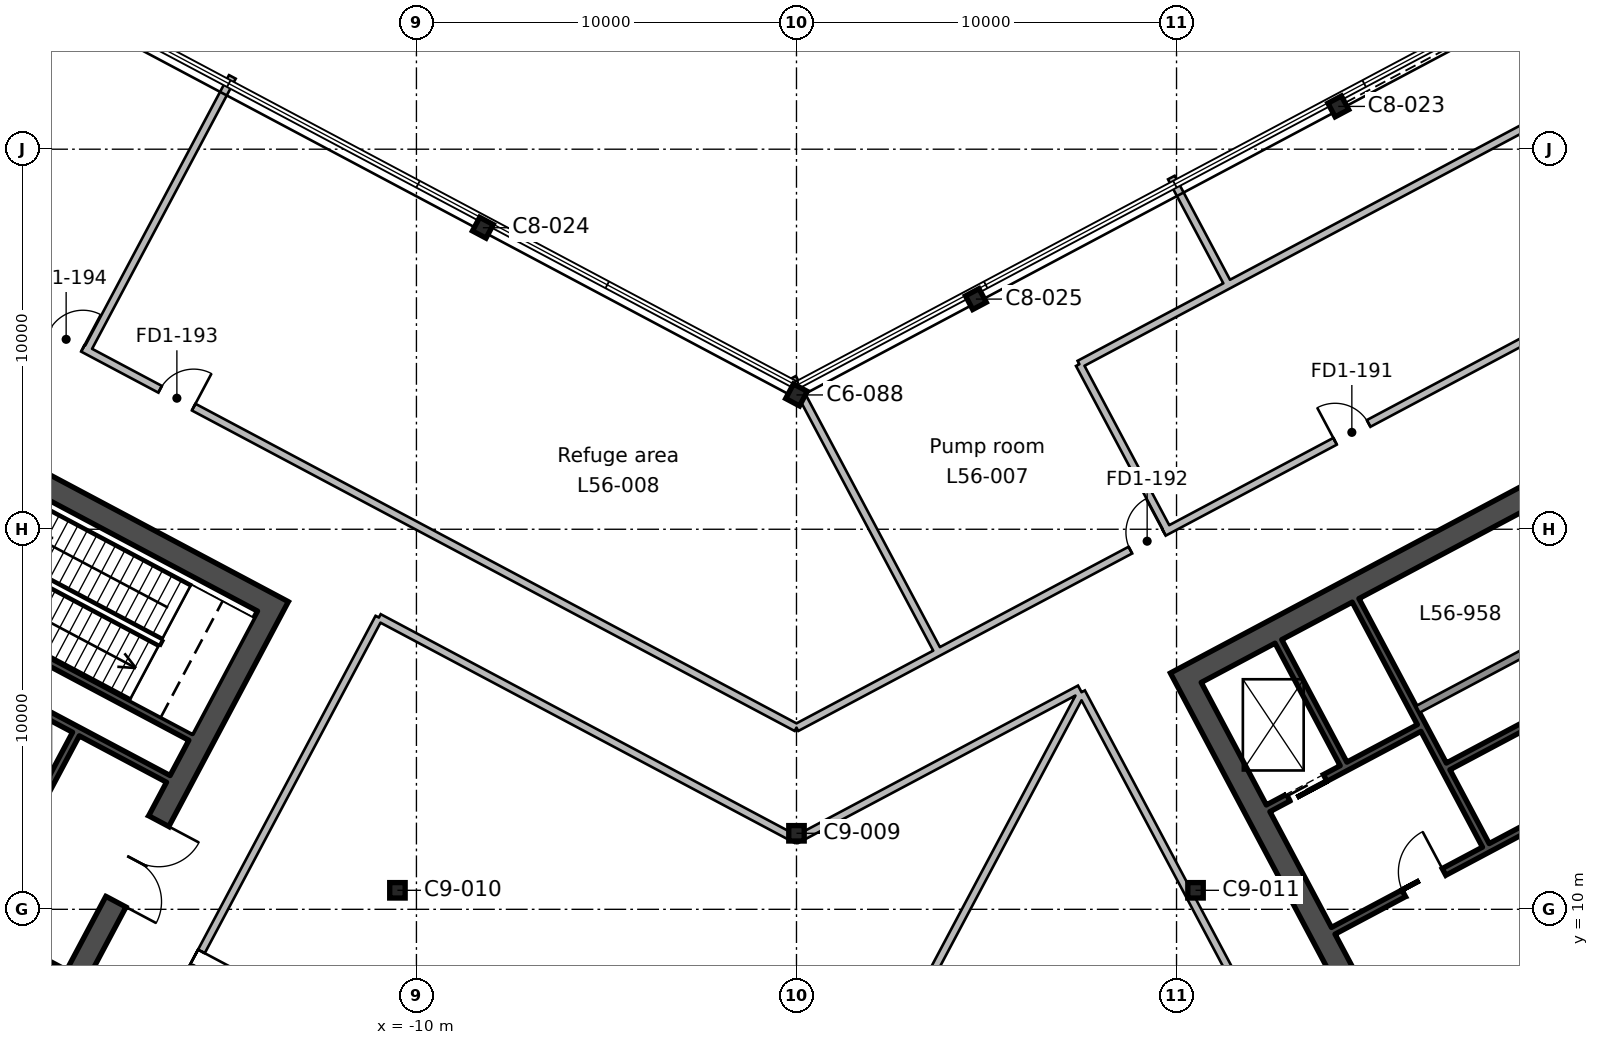
"""IFC4 building model, lengths in metres.
Left out: names, types, materials, properties, quantities, classifications, styles, units other than length and angle.
Written with IfcOpenShell. Run it as: python <this file> out.ifc"""

import sys

from ifc_helpers import new_model, si_unit, direction, frame, frame_2d, origin, origin_2d, place, context, subcontext, project, spatial, rectangle, hollow_rectangle, i_section, extrude, element, fill, save


model = new_model("IFC4")
c1 = context("Model", 3, precision=1e-05, world=origin(), true_north=direction((0.0, 1.0)))
c2 = subcontext(c1, "Body", "Model", "MODEL_VIEW")
j1 = project(units=[si_unit("LENGTHUNIT", "METRE"), si_unit("PLANEANGLEUNIT", "RADIAN")], contexts=[c1])
p1 = place(None, origin())
s1 = spatial("IfcSite", under=j1, at=p1, CompositionType="ELEMENT")
p2 = place(p1, origin())
s2 = spatial("IfcBuilding", under=s1, at=p2, CompositionType="ELEMENT")
p3 = place(p2, frame((0.0, 0.0, 252.0)))
s3 = spatial("IfcBuildingStorey", under=s2, at=p3, CompositionType="ELEMENT", Elevation=252.0)
for number, where, z_axis, x_axis in (
    (1, (-10.5, 10.5, 0.0), (0.0, 0.0, 1.0), (1.0, 0.0, 0.0)),
    (2, (10.5, 10.5, 0.0), (0.0, 0.0, 1.0), (1.0, 0.0, 0.0)),
    (3, (0.0, 12.0, 0.0), (0.0, 0.0, 1.0), (1.0, 0.0, 0.0)),
):
    element("IfcColumn", number, at=place(p3, frame(where, z_axis=z_axis, x_axis=x_axis)), inside=s3, PredefinedType="COLUMN", context=c2, shape_type="SweptSolid", body=[
        extrude(hollow_rectangle(XDim=0.406, YDim=0.406, WallThickness=0.015, InnerFilletRadius=0.007, OuterFilletRadius=0.022, at=origin_2d()), origin(), (0.0, 0.0, 1.0), 6.0),
    ])
p4 = place(p3, frame((0.0, 23.534, 0.0), z_axis=(0.0, 0.0, 1.0), x_axis=(-0.882947592859, 0.469471562786, 0.0)))
e4 = element("IfcColumn", 4, at=p4, inside=s3, PredefinedType="COLUMN", context=c2, shape_type="SweptSolid", body=[
    extrude(i_section(OverallWidth=0.412, OverallDepth=0.434, WebThickness=0.036, FlangeThickness=0.057, FilletRadius=0.015, at=origin_2d()), origin(), (0.0, 0.0, 1.0), 6.0),
])
for number, where, z_axis, x_axis in (
    (5, (4.72, 26.056, 0.0), (0.0, 0.0, 1.0), (-0.883, -0.469, 0.0)),
    (6, (-8.252, 27.934, 0.0), (0.0, 0.0, 1.0), (-0.883, 0.469, 0.0)),
    (7, (14.256, 31.126, 0.0), (0.0, 0.0, 1.0), (-0.883, -0.469, 0.0)),
):
    element("IfcColumn", number, at=place(p3, frame(where, z_axis=z_axis, x_axis=x_axis)), inside=s3, PredefinedType="COLUMN", context=c2, shape_type="SweptSolid", body=[
        extrude(i_section(OverallWidth=0.404, OverallDepth=0.406, WebThickness=0.027, FlangeThickness=0.044, FilletRadius=0.015, at=origin_2d()), origin(), (0.0, 0.0, 1.0), 6.0),
    ])
p5 = place(p3, frame((-13.635, 18.236, 0.0), z_axis=(0.0, 0.0, 1.0), x_axis=(-0.469478769487, -0.88294376095, 0.0)))
e8 = element("IfcWall", 8, at=p5, inside=s3, PredefinedType="SHEAR", context=c2, shape_type="SweptSolid", body=[
    extrude(rectangle(XDim=19.4, YDim=0.6, at=frame_2d((9.7, 0.0))), origin(), (0.0, 0.0, 1.0), 6.0),
])
p6 = place(p5, frame((6.7, 0.0, 0.0)))
e9 = element("IfcOpeningElement", 9, at=p6, cuts=e8, PredefinedType="OPENING", context=c2, shape_type="SweptSolid", body=[
    extrude(rectangle(XDim=2.4, YDim=2.4, at=frame_2d((1.2, 1.2))), frame((0.0, 0.31, 0.0), z_axis=(0.0, -1.0, 0.0), x_axis=(1.0, 0.0, 0.0)), (0.0, 0.0, 1.0), 0.62),
])
p7 = place(p3, frame((-14.041, 18.112, 0.0), z_axis=(0.0, 0.0, 1.0), x_axis=(-0.882947755831, 0.46947125628, 0.0)))
e10 = element("IfcWall", 10, at=p7, inside=s3, PredefinedType="SHEAR", context=c2, shape_type="SweptSolid", body=[
    extrude(rectangle(XDim=20.2, YDim=0.6, at=frame_2d((10.1, 0.0))), origin(), (0.0, 0.0, 1.0), 6.0),
])
p8 = place(p3, frame((-18.96, 14.611, 0.0), z_axis=(0.0, 0.0, 1.0), x_axis=(-0.4694473164, -0.882960484464, 0.0)))
e11 = element("IfcWall", 11, at=p8, inside=s3, PredefinedType="SHEAR", context=c2, shape_type="SweptSolid", body=[
    extrude(rectangle(XDim=2.2, YDim=0.2, at=frame_2d((1.1, 0.0))), origin(), (0.0, 0.0, 1.0), 6.0),
])
p9 = place(p3, frame((-15.942, 14.536, 0.0), z_axis=(0.0, 0.0, 1.0), x_axis=(-0.882946947542, 0.469472776449, 0.0)))
e12 = element("IfcWall", 12, at=p9, inside=s3, PredefinedType="SHEAR", context=c2, shape_type="SweptSolid", body=[
    extrude(rectangle(XDim=8.0, YDim=0.2, at=frame_2d((4.0, 0.0))), origin(), (0.0, 0.0, 1.0), 6.0),
])
p10 = place(p3, frame((-16.529, 13.432, 0.0), z_axis=(0.0, 0.0, 1.0), x_axis=(-0.88295287151, 0.469461634952, 0.0)))
e13 = element("IfcWall", 13, at=p10, inside=s3, PredefinedType="SHEAR", context=c2, shape_type="SweptSolid", body=[
    extrude(rectangle(XDim=8.0, YDim=0.2, at=frame_2d((4.0, 0.0))), origin(), (0.0, 0.0, 1.0), 6.0),
])
p11 = place(p3, frame((-19.252, 8.311, 0.0), z_axis=(0.0, 0.0, 1.0), x_axis=(-0.882955722218, 0.469456273365, 0.0)))
e14 = element("IfcWall", 14, at=p11, inside=s3, PredefinedType="SHEAR", context=c2, shape_type="SweptSolid", body=[
    extrude(rectangle(XDim=10.0, YDim=0.2, at=frame_2d((5.0, 0.0))), origin(), (0.0, 0.0, 1.0), 6.0),
])
p12 = place(p11, frame((2.1, 0.0, 0.0)))
e15 = element("IfcOpeningElement", 15, at=p12, cuts=e14, PredefinedType="OPENING", context=c2, shape_type="SweptSolid", body=[
    extrude(rectangle(XDim=1.2, YDim=2.1, at=frame_2d((0.6, 1.05))), frame((0.0, 0.11, 0.0), z_axis=(0.0, -1.0, 0.0), x_axis=(1.0, 0.0, 0.0)), (0.0, 0.0, 1.0), 0.22),
])
p13 = place(p3, frame((19.211, -0.771, 0.0), z_axis=(0.0, 0.0, 1.0), x_axis=(-0.469463742137, 0.882951751127, 0.0)))
e16 = element("IfcWall", 16, at=p13, inside=s3, PredefinedType="SHEAR", context=c2, shape_type="SweptSolid", body=[
    extrude(rectangle(XDim=19.4, YDim=0.6, at=frame_2d((9.7, 0.0))), origin(), (0.0, 0.0, 1.0), 6.0),
])
p14 = place(p13, frame((6.7, 0.0, 0.0)))
e17 = element("IfcOpeningElement", 17, at=p14, cuts=e16, PredefinedType="OPENING", context=c2, shape_type="SweptSolid", body=[
    extrude(rectangle(XDim=2.4, YDim=2.4, at=frame_2d((1.2, 1.2))), frame((0.0, 0.31, 0.0), z_axis=(0.0, -1.0, 0.0), x_axis=(1.0, 0.0, 0.0)), (0.0, 0.0, 1.0), 0.62),
])
p15 = place(p3, frame((10.509, 16.234, 0.0), z_axis=(0.0, 0.0, 1.0), x_axis=(0.88295010195, 0.469466843842, 0.0)))
e18 = element("IfcWall", 18, at=p15, inside=s3, PredefinedType="SHEAR", context=c2, shape_type="SweptSolid", body=[
    extrude(rectangle(XDim=20.2, YDim=0.6, at=frame_2d((10.1, 0.0))), origin(), (0.0, 0.0, 1.0), 6.0),
])
p16 = place(p3, frame((14.394, 13.826, 0.0), z_axis=(0.0, 0.0, 1.0), x_axis=(-0.469494272526, 0.882935517501, 0.0)))
e19 = element("IfcWall", 19, at=p16, inside=s3, PredefinedType="SHEAR", context=c2, shape_type="SweptSolid", body=[
    extrude(rectangle(XDim=3.65, YDim=0.2, at=frame_2d((1.825, 0.0))), origin(), (0.0, 0.0, 1.0), 6.0),
])
p17 = place(p3, frame((18.138, 11.683, 0.0), z_axis=(0.0, 0.0, 1.0), x_axis=(-0.469480409012, 0.88294288918, 0.0)))
e20 = element("IfcWall", 20, at=p17, inside=s3, PredefinedType="SHEAR", context=c2, shape_type="SweptSolid", body=[
    extrude(rectangle(XDim=7.3, YDim=0.2, at=frame_2d((3.65, 0.0))), origin(), (0.0, 0.0, 1.0), 6.0),
])
p18 = place(p3, frame((18.104, 7.701, 0.0), z_axis=(0.0, 0.0, 1.0), x_axis=(0.882952937579, 0.469461510692, 0.0)))
e21 = element("IfcWall", 21, at=p18, inside=s3, PredefinedType="SHEAR", context=c2, shape_type="SweptSolid", body=[
    extrude(rectangle(XDim=5.4, YDim=0.2, at=frame_2d((2.7, 0.0))), origin(), (0.0, 0.0, 1.0), 6.0),
])
p19 = place(p18, frame((2.25, 0.0, 0.0)))
e22 = element("IfcOpeningElement", 22, at=p19, cuts=e21, PredefinedType="OPENING", context=c2, shape_type="SweptSolid", body=[
    extrude(rectangle(XDim=0.9, YDim=2.1, at=frame_2d((0.45, 1.05))), frame((0.0, 0.11, 0.0), z_axis=(0.0, -1.0, 0.0), x_axis=(1.0, 0.0, 0.0)), (0.0, 0.0, 1.0), 0.22),
])
p20 = place(p3, frame((14.124, 9.435, 0.0), z_axis=(0.0, 0.0, 1.0), x_axis=(0.882940221191, 0.469485426614, 0.0)))
e23 = element("IfcWall", 23, at=p20, inside=s3, PredefinedType="SHEAR", context=c2, shape_type="SweptSolid", body=[
    extrude(rectangle(XDim=10.0, YDim=0.2, at=frame_2d((5.0, 0.0))), origin(), (0.0, 0.0, 1.0), 6.0),
])
p21 = place(p20, frame((2.1, 0.0, 0.0)))
e24 = element("IfcOpeningElement", 24, at=p21, cuts=e23, PredefinedType="OPENING", context=c2, shape_type="SweptSolid", body=[
    extrude(rectangle(XDim=1.2, YDim=2.1, at=frame_2d((0.6, 1.05))), frame((0.0, 0.11, 0.0), z_axis=(0.0, -1.0, 0.0), x_axis=(1.0, 0.0, 0.0)), (0.0, 0.0, 1.0), 0.22),
])
p22 = place(p20, frame((6.85, 0.0, 0.0)))
e25 = element("IfcOpeningElement", 25, at=p22, cuts=e23, PredefinedType="OPENING", context=c2, shape_type="SweptSolid", body=[
    extrude(rectangle(XDim=0.9, YDim=2.1, at=frame_2d((0.45, 1.05))), frame((0.0, 0.11, 0.0), z_axis=(0.0, -1.0, 0.0), x_axis=(1.0, 0.0, 0.0)), (0.0, 0.0, 1.0), 0.22),
])
p23 = place(p3, frame((17.147, 13.761, 0.0), z_axis=(0.0, 0.0, 1.0), x_axis=(0.882964314875, 0.469440111896, 0.0)))
e26 = element("IfcWall", 26, at=p23, inside=s3, PredefinedType="SHEAR", context=c2, shape_type="SweptSolid", body=[
    extrude(rectangle(XDim=5.2, YDim=0.2, at=frame_2d((2.6, 0.0))), origin(), (0.0, 0.0, 1.0), 6.0),
])
p24 = place(p3, frame((12.41, 12.658, 0.0), z_axis=(0.0, 0.0, 1.0), x_axis=(0.8829484765, 0.469469900894, 0.0)))
e27 = element("IfcWall", 27, at=p24, inside=s3, PredefinedType="SHEAR", context=c2, shape_type="SweptSolid", body=[
    extrude(rectangle(XDim=4.5, YDim=0.2, at=frame_2d((2.25, 0.0))), origin(), (0.0, 0.0, 1.0), 6.0),
])
p25 = place(p24, frame((0.6, 0.0, 0.0)))
e28 = element("IfcOpeningElement", 28, at=p25, cuts=e27, PredefinedType="OPENING", context=c2, shape_type="SweptSolid", body=[
    extrude(rectangle(XDim=1.1, YDim=2.1, at=frame_2d((0.55, 1.05))), frame((0.0, 0.11, 0.0), z_axis=(0.0, -1.0, 0.0), x_axis=(1.0, 0.0, 0.0)), (0.0, 0.0, 1.0), 0.22),
])
p26 = place(p3, frame((16.349, 15.262, 0.0), z_axis=(0.0, 0.0, 1.0), x_axis=(0.882953967957, 0.469459572775, 0.0)))
e29 = element("IfcWall", 29, at=p26, inside=s3, PredefinedType="SOLIDWALL", context=c2, shape_type="SweptSolid", body=[
    extrude(rectangle(XDim=5.2, YDim=0.2, at=frame_2d((2.6, 0.0))), origin(), (0.0, 0.0, 1.0), 6.0),
])
p27 = place(p3, frame((-12.995, -7.871, 0.0), z_axis=(0.0, 0.0, 1.0), x_axis=(-0.882943167342, 0.469479885878, 0.0)))
e30 = element("IfcWall", 30, at=p27, inside=s3, PredefinedType="PARTITIONING", context=c2, shape_type="SweptSolid", body=[
    extrude(rectangle(XDim=36.174, YDim=0.2, at=frame_2d((18.087, 0.0))), origin(), (0.0, 0.0, 1.0), 5.55),
])
p28 = place(p27, frame((21.45, 0.0, 0.0)))
e31 = element("IfcOpeningElement", 31, at=p28, cuts=e30, PredefinedType="OPENING", context=c2, shape_type="SweptSolid", body=[
    extrude(rectangle(XDim=1.0, YDim=2.1, at=frame_2d((0.5, 1.05))), frame((0.0, 0.11, 0.0), z_axis=(0.0, -1.0, 0.0), x_axis=(1.0, 0.0, 0.0)), (0.0, 0.0, 1.0), 0.22),
])
p29 = place(p27, frame((17.55, 0.0, 0.0)))
e32 = element("IfcOpeningElement", 32, at=p29, cuts=e30, PredefinedType="OPENING", context=c2, shape_type="SweptSolid", body=[
    extrude(rectangle(XDim=1.0, YDim=2.1, at=frame_2d((0.5, 1.05))), frame((0.0, 0.11, 0.0), z_axis=(0.0, -1.0, 0.0), x_axis=(1.0, 0.0, 0.0)), (0.0, 0.0, 1.0), 0.22),
])
p30 = place(p3, frame((-32.682, 32.157, 0.0), z_axis=(0.0, 0.0, 1.0), x_axis=(0.88295110087, -0.469464965118, 0.0)))
e33 = element("IfcWall", 33, at=p30, inside=s3, PredefinedType="PARTITIONING", context=c2, shape_type="SweptSolid", body=[
    extrude(rectangle(XDim=37.014, YDim=0.2, at=frame_2d((18.507, 0.0))), origin(), (0.0, 0.0, 1.0), 5.55),
])
p31 = place(p30, frame((18.05, 0.0, 0.0)))
e34 = element("IfcOpeningElement", 34, at=p31, cuts=e33, PredefinedType="OPENING", context=c2, shape_type="SweptSolid", body=[
    extrude(rectangle(XDim=1.0, YDim=2.1, at=frame_2d((0.5, 1.05))), frame((0.0, 0.11, 0.0), z_axis=(0.0, -1.0, 0.0), x_axis=(1.0, 0.0, 0.0)), (0.0, 0.0, 1.0), 0.22),
])
p32 = place(p30, frame((14.75, 0.0, 0.0)))
e35 = element("IfcOpeningElement", 35, at=p32, cuts=e33, PredefinedType="OPENING", context=c2, shape_type="SweptSolid", body=[
    extrude(rectangle(XDim=1.0, YDim=2.1, at=frame_2d((0.5, 1.05))), frame((0.0, 0.11, 0.0), z_axis=(0.0, -1.0, 0.0), x_axis=(1.0, 0.0, 0.0)), (0.0, 0.0, 1.0), 0.22),
])
p33 = place(p3, frame((0.0, 14.78, 0.0), z_axis=(0.0, 0.0, 1.0), x_axis=(0.882955567988, 0.469456563443, 0.0)))
e36 = element("IfcWall", 36, at=p33, inside=s3, PredefinedType="PARTITIONING", context=c2, shape_type="SweptSolid", body=[
    extrude(rectangle(XDim=33.111, YDim=0.2, at=frame_2d((16.555, 0.0))), origin(), (0.0, 0.0, 1.0), 5.55),
])
p34 = place(p33, frame((16.05, 0.0, 0.0)))
e37 = element("IfcOpeningElement", 37, at=p34, cuts=e36, PredefinedType="OPENING", context=c2, shape_type="SweptSolid", body=[
    extrude(rectangle(XDim=1.0, YDim=2.1, at=frame_2d((0.5, 1.05))), frame((0.0, 0.11, 0.0), z_axis=(0.0, -1.0, 0.0), x_axis=(1.0, 0.0, 0.0)), (0.0, 0.0, 1.0), 0.22),
])
p35 = place(p33, frame((9.95, 0.0, 0.0)))
e38 = element("IfcOpeningElement", 38, at=p35, cuts=e36, PredefinedType="OPENING", context=c2, shape_type="SweptSolid", body=[
    extrude(rectangle(XDim=1.0, YDim=2.1, at=frame_2d((0.5, 1.05))), frame((0.0, 0.11, 0.0), z_axis=(0.0, -1.0, 0.0), x_axis=(1.0, 0.0, 0.0)), (0.0, 0.0, 1.0), 0.22),
])
p36 = place(p3, frame((-14.844, 31.903, 0.0), z_axis=(0.0, 0.0, 1.0), x_axis=(-0.469351618214, -0.883011358069, 0.0)))
e39 = element("IfcWall", 39, at=p36, inside=s3, PredefinedType="PARTITIONING", context=c2, shape_type="SweptSolid", body=[
    extrude(rectangle(XDim=8.149, YDim=0.2, at=frame_2d((4.075, 0.0))), origin(), (0.0, 0.0, 1.0), 5.55),
])
p37 = place(p3, frame((-0.105, 23.984, 0.0), z_axis=(0.0, 0.0, 1.0), x_axis=(0.469329164555, -0.883023292614, 0.0)))
e40 = element("IfcWall", 40, at=p37, inside=s3, PredefinedType="PARTITIONING", context=c2, shape_type="SweptSolid", body=[
    extrude(rectangle(XDim=8.175, YDim=0.2, at=frame_2d((4.088, 0.0))), origin(), (0.0, 0.0, 1.0), 5.55),
])
p38 = place(p3, frame((7.501, 15.713, 0.0), z_axis=(0.0, 0.0, 1.0), x_axis=(-0.46948341094, -0.882941292982, 0.0)))
e41 = element("IfcWall", 41, at=p38, inside=s3, PredefinedType="PARTITIONING", context=c2, shape_type="SweptSolid", body=[
    extrude(rectangle(XDim=27.845, YDim=0.2, at=frame_2d((13.923, 0.0))), origin(), (0.0, 0.0, 1.0), 5.55),
])
p39 = place(p3, frame((-20.799, -0.776, 0.0), z_axis=(0.0, 0.0, 1.0), x_axis=(0.469488010228, 0.882938847402, 0.0)))
e42 = element("IfcWall", 42, at=p39, inside=s3, PredefinedType="PARTITIONING", context=c2, shape_type="SweptSolid", body=[
    extrude(rectangle(XDim=20.899, YDim=0.2, at=frame_2d((10.45, 0.0))), origin(), (0.0, 0.0, 1.0), 5.55),
])
p40 = place(p39, frame((9.95, 0.0, 0.0)))
e43 = element("IfcOpeningElement", 43, at=p40, cuts=e42, PredefinedType="OPENING", context=c2, shape_type="SweptSolid", body=[
    extrude(rectangle(XDim=1.0, YDim=2.1, at=frame_2d((0.5, 1.05))), frame((0.0, 0.11, 0.0), z_axis=(0.0, -1.0, 0.0), x_axis=(1.0, 0.0, 0.0)), (0.0, 0.0, 1.0), 0.22),
])
p41 = place(p3, frame((-10.987, 17.677, 0.0), z_axis=(0.0, 0.0, 1.0), x_axis=(0.882943685488, -0.469478911407, 0.0)))
e44 = element("IfcWall", 44, at=p41, inside=s3, PredefinedType="PARTITIONING", context=c2, shape_type="SweptSolid", body=[
    extrude(rectangle(XDim=12.444, YDim=0.2, at=frame_2d((6.222, 0.0))), origin(), (0.0, 0.0, 1.0), 5.55),
])
p42 = place(p3, frame((0.0, 11.835, 0.0), z_axis=(0.0, 0.0, 1.0), x_axis=(0.882938953492, 0.469487810711, 0.0)))
e45 = element("IfcWall", 45, at=p42, inside=s3, PredefinedType="PARTITIONING", context=c2, shape_type="SweptSolid", body=[
    extrude(rectangle(XDim=8.443, YDim=0.2, at=frame_2d((4.222, 0.0))), origin(), (0.0, 0.0, 1.0), 5.55),
])
p43 = place(p3, frame((7.501, 15.713, 0.0), z_axis=(0.0, 0.0, 1.0), x_axis=(0.469480417329, -0.882942884758, 0.0)))
e46 = element("IfcWall", 46, at=p43, inside=s3, PredefinedType="PARTITIONING", context=c2, shape_type="SweptSolid", body=[
    extrude(rectangle(XDim=20.802, YDim=0.2, at=frame_2d((10.401, 0.0))), origin(), (0.0, 0.0, 1.0), 5.55),
])
p44 = place(p3, frame((11.355, 26.424, 0.0), z_axis=(0.0, 0.0, 1.0), x_axis=(-0.882846627183, -0.469661402366, 0.0)))
e47 = element("IfcWall", 47, at=p44, inside=s3, PredefinedType="PARTITIONING", context=c2, shape_type="SweptSolid", body=[
    extrude(rectangle(XDim=4.431, YDim=0.2, at=frame_2d((2.215, 0.0))), origin(), (0.0, 0.0, 1.0), 5.55),
])
p45 = place(p3, frame((7.443, 24.343, 0.0), z_axis=(0.0, 0.0, 1.0), x_axis=(0.46941874991, -0.882975671937, 0.0)))
e48 = element("IfcWall", 48, at=p45, inside=s3, PredefinedType="PARTITIONING", context=c2, shape_type="SweptSolid", body=[
    extrude(rectangle(XDim=4.899, YDim=0.2, at=frame_2d((2.45, 0.0))), origin(), (0.0, 0.0, 1.0), 5.55),
])
p46 = place(p3, frame((9.864, 29.255, 0.0), z_axis=(0.0, 0.0, 1.0), x_axis=(0.469447181805, -0.882960556025, 0.0)))
e49 = element("IfcWall", 49, at=p46, inside=s3, PredefinedType="PARTITIONING", context=c2, shape_type="SweptSolid", body=[
    extrude(rectangle(XDim=3.199, YDim=0.2, at=frame_2d((1.6, 0.0))), origin(), (0.0, 0.0, 1.0), 5.55),
])
p47 = place(p3, frame((11.355, 26.424, 0.0), z_axis=(0.0, 0.0, 1.0), x_axis=(0.882971344108, 0.469426890458, 0.0)))
e50 = element("IfcWall", 50, at=p47, inside=s3, PredefinedType="PARTITIONING", context=c2, shape_type="SweptSolid", body=[
    extrude(rectangle(XDim=16.929, YDim=0.2, at=frame_2d((8.465, 0.0))), origin(), (0.0, 0.0, 1.0), 5.55),
])
p48 = place(p6, origin())
e51 = element("IfcDoor", 51, at=p48, inside=s3, OperationType="DOUBLE_DOOR_SINGLE_SWING", PredefinedType="DOOR", context=c2, shape_type="SweptSolid", body=[
    extrude(rectangle(XDim=2.4, YDim=2.4, at=frame_2d((1.2, 1.2))), frame((0.0, 0.025, 0.0), z_axis=(0.0, -1.0, 0.0), x_axis=(1.0, 0.0, 0.0)), (0.0, 0.0, 1.0), 0.05),
])
fill(e9, e51)
p49 = place(p21, origin())
e52 = element("IfcDoor", 52, at=p49, inside=s3, OperationType="SINGLE_SWING_RIGHT", PredefinedType="DOOR", context=c2, shape_type="SweptSolid", body=[
    extrude(rectangle(XDim=1.2, YDim=2.1, at=frame_2d((0.6, 1.05))), frame((0.0, 0.025, 0.0), z_axis=(0.0, -1.0, 0.0), x_axis=(1.0, 0.0, 0.0)), (0.0, 0.0, 1.0), 0.05),
])
fill(e24, e52)
p50 = place(p25, origin())
e53 = element("IfcDoor", 53, at=p50, inside=s3, OperationType="DOUBLE_DOOR_SLIDING", PredefinedType="DOOR", context=c2, shape_type="SweptSolid", body=[
    extrude(rectangle(XDim=1.1, YDim=2.1, at=frame_2d((0.55, 1.05))), frame((0.0, 0.025, 0.0), z_axis=(0.0, -1.0, 0.0), x_axis=(1.0, 0.0, 0.0)), (0.0, 0.0, 1.0), 0.05),
])
fill(e28, e53)
p51 = place(p34, origin())
e54 = element("IfcDoor", 54, at=p51, inside=s3, OperationType="SINGLE_SWING_LEFT", PredefinedType="DOOR", context=c2, shape_type="SweptSolid", body=[
    extrude(rectangle(XDim=1.0, YDim=2.1, at=frame_2d((0.5, 1.05))), frame((0.0, 0.025, 0.0), z_axis=(0.0, -1.0, 0.0), x_axis=(1.0, 0.0, 0.0)), (0.0, 0.0, 1.0), 0.05),
])
fill(e37, e54)
p52 = place(p35, origin())
e55 = element("IfcDoor", 55, at=p52, inside=s3, OperationType="SINGLE_SWING_RIGHT", PredefinedType="DOOR", context=c2, shape_type="SweptSolid", body=[
    extrude(rectangle(XDim=1.0, YDim=2.1, at=frame_2d((0.5, 1.05))), frame((0.0, 0.025, 0.0), z_axis=(0.0, -1.0, 0.0), x_axis=(1.0, 0.0, 0.0)), (0.0, 0.0, 1.0), 0.05),
])
fill(e38, e55)
p53 = place(p31, origin())
e56 = element("IfcDoor", 56, at=p53, inside=s3, OperationType="SINGLE_SWING_RIGHT", PredefinedType="DOOR", context=c2, shape_type="SweptSolid", body=[
    extrude(rectangle(XDim=1.0, YDim=2.1, at=frame_2d((0.5, 1.05))), frame((0.0, 0.025, 0.0), z_axis=(0.0, -1.0, 0.0), x_axis=(1.0, 0.0, 0.0)), (0.0, 0.0, 1.0), 0.05),
])
fill(e34, e56)
p54 = place(p32, origin())
e57 = element("IfcDoor", 57, at=p54, inside=s3, OperationType="SINGLE_SWING_RIGHT", PredefinedType="DOOR", context=c2, shape_type="SweptSolid", body=[
    extrude(rectangle(XDim=1.0, YDim=2.1, at=frame_2d((0.5, 1.05))), frame((0.0, 0.025, 0.0), z_axis=(0.0, -1.0, 0.0), x_axis=(1.0, 0.0, 0.0)), (0.0, 0.0, 1.0), 0.05),
])
fill(e35, e57)
p55 = place(p40, frame((1.0, 0.0, 0.0), z_axis=(0.0, 0.0, 1.0), x_axis=(-1.0, 0.0, 0.0)))
e58 = element("IfcDoor", 58, at=p55, inside=s3, OperationType="SINGLE_SWING_LEFT", PredefinedType="DOOR", context=c2, shape_type="SweptSolid", body=[
    extrude(rectangle(XDim=1.0, YDim=2.1, at=frame_2d((0.5, 1.05))), frame((0.0, 0.025, 0.0), z_axis=(0.0, -1.0, 0.0), x_axis=(1.0, 0.0, 0.0)), (0.0, 0.0, 1.0), 0.05),
])
fill(e43, e58)
save(model, sys.argv[1])
